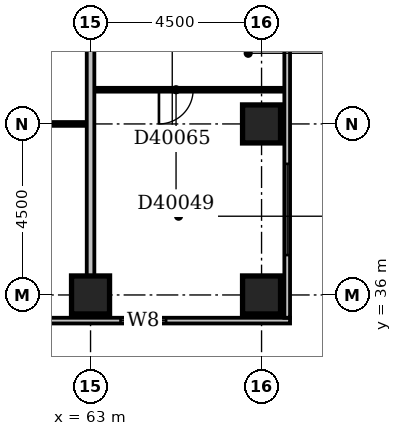
"""IFC4 building model, lengths in metres.
Left out: names, types, materials, properties, quantities, classifications, styles, units other than length and angle.
Written with IfcOpenShell. Run it as: python <this file> out.ifc"""

import sys

from ifc_helpers import new_model, si_unit, direction, frame, frame_2d, origin, origin_2d, place, context, subcontext, project, spatial, rectangle, extrude, element, fill, save


model = new_model("IFC4")
c1 = context("Model", 3, precision=1e-05, world=origin(), true_north=direction((0.0, 1.0)))
c2 = subcontext(c1, "Body", "Model", "MODEL_VIEW")
j1 = project(units=[si_unit("LENGTHUNIT", "METRE"), si_unit("PLANEANGLEUNIT", "RADIAN")], contexts=[c1])
p1 = place(None, origin())
s1 = spatial("IfcSite", under=j1, at=p1, CompositionType="ELEMENT")
p2 = place(p1, origin())
s2 = spatial("IfcBuilding", under=s1, at=p2, CompositionType="ELEMENT")
p3 = place(p2, frame((0.0, 0.0, 159.2)))
s3 = spatial("IfcBuildingStorey", under=s2, at=p3, CompositionType="ELEMENT", Elevation=159.2)
for number, where, z_axis, x_axis in (
    (1, (63.0, 36.0, -0.3), (0.0, 0.0, 1.0), (1.0, 0.0, 0.0)),
    (2, (67.5, 36.0, -0.3), (0.0, 0.0, 1.0), (1.0, 0.0, 0.0)),
    (3, (67.5, 40.5, -0.3), (0.0, 0.0, 1.0), (1.0, 0.0, 0.0)),
):
    element("IfcColumn", number, at=place(p3, frame(where, z_axis=z_axis, x_axis=x_axis)), inside=s3, PredefinedType="COLUMN", context=c2, shape_type="SweptSolid", body=[
        extrude(rectangle(XDim=1.0, YDim=1.0, at=origin_2d()), origin(), (0.0, 0.0, 1.0), 3.6),
    ])
p4 = place(p3, frame((23.1, 35.325, 0.0), z_axis=(0.0, 0.0, 1.0), x_axis=(1.0, 0.0, 0.0)))
e4 = element("IfcWall", 4, at=p4, inside=s3, PredefinedType="STANDARD", context=c2, shape_type="SweptSolid", body=[
    extrude(rectangle(XDim=45.15, YDim=0.15, at=frame_2d((22.575, 0.0))), origin(), (0.0, 0.0, 1.0), 2.7),
])
p5 = place(p4, frame((0.45, 0.0, 0.6)))
e5 = element("IfcOpeningElement", 5, at=p5, cuts=e4, PredefinedType="OPENING", context=c2, shape_type="SweptSolid", body=[
    extrude(rectangle(XDim=2.4, YDim=1.8, at=frame_2d((1.2, 0.9))), frame((0.0, 0.087, 0.0), z_axis=(0.0, -1.0, 0.0), x_axis=(1.0, 0.0, 0.0)), (0.0, 0.0, 1.0), 0.174),
])
p6 = place(p4, frame((4.95, 0.0, 0.6)))
e6 = element("IfcOpeningElement", 6, at=p6, cuts=e4, PredefinedType="OPENING", context=c2, shape_type="SweptSolid", body=[
    extrude(rectangle(XDim=2.4, YDim=1.8, at=frame_2d((1.2, 0.9))), frame((0.0, 0.087, 0.0), z_axis=(0.0, -1.0, 0.0), x_axis=(1.0, 0.0, 0.0)), (0.0, 0.0, 1.0), 0.174),
])
p7 = place(p4, frame((9.22, 0.0, 0.6)))
e7 = element("IfcOpeningElement", 7, at=p7, cuts=e4, PredefinedType="OPENING", context=c2, shape_type="SweptSolid", body=[
    extrude(rectangle(XDim=1.8, YDim=1.8, at=frame_2d((0.9, 0.9))), frame((0.0, 0.087, 0.0), z_axis=(0.0, -1.0, 0.0), x_axis=(1.0, 0.0, 0.0)), (0.0, 0.0, 1.0), 0.174),
])
p8 = place(p4, frame((14.84, 0.0, 0.6)))
e8 = element("IfcOpeningElement", 8, at=p8, cuts=e4, PredefinedType="OPENING", context=c2, shape_type="SweptSolid", body=[
    extrude(rectangle(XDim=1.8, YDim=1.8, at=frame_2d((0.9, 0.9))), frame((0.0, 0.087, 0.0), z_axis=(0.0, -1.0, 0.0), x_axis=(1.0, 0.0, 0.0)), (0.0, 0.0, 1.0), 0.174),
])
p9 = place(p4, frame((18.45, 0.0, 0.6)))
e9 = element("IfcOpeningElement", 9, at=p9, cuts=e4, PredefinedType="OPENING", context=c2, shape_type="SweptSolid", body=[
    extrude(rectangle(XDim=2.4, YDim=1.8, at=frame_2d((1.2, 0.9))), frame((0.0, 0.087, 0.0), z_axis=(0.0, -1.0, 0.0), x_axis=(1.0, 0.0, 0.0)), (0.0, 0.0, 1.0), 0.174),
])
p10 = place(p4, frame((22.95, 0.0, 0.6)))
e10 = element("IfcOpeningElement", 10, at=p10, cuts=e4, PredefinedType="OPENING", context=c2, shape_type="SweptSolid", body=[
    extrude(rectangle(XDim=2.4, YDim=1.8, at=frame_2d((1.2, 0.9))), frame((0.0, 0.087, 0.0), z_axis=(0.0, -1.0, 0.0), x_axis=(1.0, 0.0, 0.0)), (0.0, 0.0, 1.0), 0.174),
])
p11 = place(p4, frame((27.45, 0.0, 0.6)))
e11 = element("IfcOpeningElement", 11, at=p11, cuts=e4, PredefinedType="OPENING", context=c2, shape_type="SweptSolid", body=[
    extrude(rectangle(XDim=2.4, YDim=1.8, at=frame_2d((1.2, 0.9))), frame((0.0, 0.087, 0.0), z_axis=(0.0, -1.0, 0.0), x_axis=(1.0, 0.0, 0.0)), (0.0, 0.0, 1.0), 0.174),
])
p12 = place(p4, frame((31.95, 0.0, 0.6)))
e12 = element("IfcOpeningElement", 12, at=p12, cuts=e4, PredefinedType="OPENING", context=c2, shape_type="SweptSolid", body=[
    extrude(rectangle(XDim=2.4, YDim=1.8, at=frame_2d((1.2, 0.9))), frame((0.0, 0.087, 0.0), z_axis=(0.0, -1.0, 0.0), x_axis=(1.0, 0.0, 0.0)), (0.0, 0.0, 1.0), 0.174),
])
p13 = place(p4, frame((36.45, 0.0, 0.6)))
e13 = element("IfcOpeningElement", 13, at=p13, cuts=e4, PredefinedType="OPENING", context=c2, shape_type="SweptSolid", body=[
    extrude(rectangle(XDim=2.4, YDim=1.8, at=frame_2d((1.2, 0.9))), frame((0.0, 0.087, 0.0), z_axis=(0.0, -1.0, 0.0), x_axis=(1.0, 0.0, 0.0)), (0.0, 0.0, 1.0), 0.174),
])
p14 = place(p4, frame((40.689, 0.0, 0.6)))
e14 = element("IfcOpeningElement", 14, at=p14, cuts=e4, PredefinedType="OPENING", context=c2, shape_type="SweptSolid", body=[
    extrude(rectangle(XDim=1.2, YDim=1.8, at=frame_2d((0.6, 0.9))), frame((0.0, 0.087, 0.0), z_axis=(0.0, -1.0, 0.0), x_axis=(1.0, 0.0, 0.0)), (0.0, 0.0, 1.0), 0.174),
])
p15 = place(p3, frame((68.175, 35.4, 0.0), z_axis=(0.0, 0.0, 1.0), x_axis=(0.0, 1.0, 0.0)))
e15 = element("IfcWall", 15, at=p15, inside=s3, PredefinedType="STANDARD", context=c2, shape_type="SweptSolid", body=[
    extrude(rectangle(XDim=23.85, YDim=0.15, at=frame_2d((11.925, 0.0))), origin(), (0.0, 0.0, 1.0), 2.7),
])
p16 = place(p15, frame((1.65, 0.0, 0.6)))
e16 = element("IfcOpeningElement", 16, at=p16, cuts=e15, PredefinedType="OPENING", context=c2, shape_type="SweptSolid", body=[
    extrude(rectangle(XDim=2.4, YDim=1.8, at=frame_2d((1.2, 0.9))), frame((0.0, 0.087, 0.0), z_axis=(0.0, -1.0, 0.0), x_axis=(1.0, 0.0, 0.0)), (0.0, 0.0, 1.0), 0.174),
])
p17 = place(p15, frame((19.65, 0.0, 0.6)))
e17 = element("IfcOpeningElement", 17, at=p17, cuts=e15, PredefinedType="OPENING", context=c2, shape_type="SweptSolid", body=[
    extrude(rectangle(XDim=2.4, YDim=1.8, at=frame_2d((1.2, 0.9))), frame((0.0, 0.087, 0.0), z_axis=(0.0, -1.0, 0.0), x_axis=(1.0, 0.0, 0.0)), (0.0, 0.0, 1.0), 0.174),
])
p18 = place(p3, frame((63.0, 36.5, 0.0), z_axis=(0.0, 0.0, 1.0), x_axis=(0.0, 1.0, 0.0)))
e18 = element("IfcWall", 18, at=p18, inside=s3, PredefinedType="PARTITIONING", context=c2, shape_type="SweptSolid", body=[
    extrude(rectangle(XDim=12.9, YDim=0.2, at=frame_2d((6.45, 0.0))), origin(), (0.0, 0.0, 1.0), 2.4),
])
p19 = place(p3, frame((58.6, 40.5, 0.0), z_axis=(0.0, 0.0, 1.0), x_axis=(1.0, 0.0, 0.0)))
e19 = element("IfcWall", 19, at=p19, inside=s3, PredefinedType="PARTITIONING", context=c2, shape_type="SweptSolid", body=[
    extrude(rectangle(XDim=4.3, YDim=0.1, at=frame_2d((2.15, 0.0))), origin(), (0.0, 0.0, 1.0), 3.3),
])
p20 = place(p19, frame((1.7, 0.0, 0.0)))
e20 = element("IfcOpeningElement", 20, at=p20, cuts=e19, PredefinedType="OPENING", context=c2, shape_type="SweptSolid", body=[
    extrude(rectangle(XDim=0.9, YDim=2.1, at=frame_2d((0.45, 1.05))), frame((0.0, 0.062, 0.0), z_axis=(0.0, -1.0, 0.0), x_axis=(1.0, 0.0, 0.0)), (0.0, 0.0, 1.0), 0.124),
])
p21 = place(p3, frame((63.1, 41.4, 0.0), z_axis=(0.0, 0.0, 1.0), x_axis=(1.0, 0.0, 0.0)))
e21 = element("IfcWall", 21, at=p21, inside=s3, PredefinedType="PARTITIONING", context=c2, shape_type="SweptSolid", body=[
    extrude(rectangle(XDim=5.0, YDim=0.1, at=frame_2d((2.5, 0.0))), origin(), (0.0, 0.0, 1.0), 3.3),
])
p22 = place(p21, frame((1.7, 0.0, 0.0)))
e22 = element("IfcOpeningElement", 22, at=p22, cuts=e21, PredefinedType="OPENING", context=c2, shape_type="SweptSolid", body=[
    extrude(rectangle(XDim=0.9, YDim=2.1, at=frame_2d((0.45, 1.05))), frame((0.0, 0.062, 0.0), z_axis=(0.0, -1.0, 0.0), x_axis=(1.0, 0.0, 0.0)), (0.0, 0.0, 1.0), 0.124),
])
p23 = place(p14, origin())
e23 = element("IfcWindow", 23, at=p23, inside=s3, PartitioningType="SINGLE_PANEL", PredefinedType="WINDOW", context=c2, shape_type="SweptSolid", body=[
    extrude(rectangle(XDim=1.2, YDim=1.8, at=frame_2d((0.6, 0.9))), frame((0.0, 0.03, 0.0), z_axis=(0.0, -1.0, 0.0), x_axis=(1.0, 0.0, 0.0)), (0.0, 0.0, 1.0), 0.06),
])
fill(e14, e23)
p24 = place(p16, origin())
e24 = element("IfcWindow", 24, at=p24, inside=s3, PartitioningType="SINGLE_PANEL", PredefinedType="WINDOW", context=c2, shape_type="SweptSolid", body=[
    extrude(rectangle(XDim=2.4, YDim=1.8, at=frame_2d((1.2, 0.9))), frame((0.0, 0.03, 0.0), z_axis=(0.0, -1.0, 0.0), x_axis=(1.0, 0.0, 0.0)), (0.0, 0.0, 1.0), 0.06),
])
fill(e16, e24)
p25 = place(p22, frame((0.9, 0.0, 0.0), z_axis=(0.0, 0.0, 1.0), x_axis=(-1.0, 0.0, 0.0)))
e25 = element("IfcDoor", 25, at=p25, inside=s3, OperationType="SINGLE_SWING_RIGHT", PredefinedType="DOOR", context=c2, shape_type="SweptSolid", body=[
    extrude(rectangle(XDim=0.9, YDim=2.1, at=frame_2d((0.45, 1.05))), frame((0.0, 0.025, 0.0), z_axis=(0.0, -1.0, 0.0), x_axis=(1.0, 0.0, 0.0)), (0.0, 0.0, 1.0), 0.05),
])
fill(e22, e25)
save(model, sys.argv[1])
